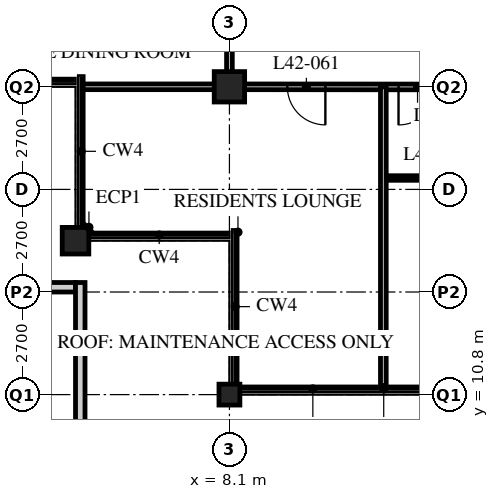
"""IFC4 building model, lengths in metres.
Left out: names, types, materials, properties, quantities, classifications, styles, units other than length and angle.
Written with IfcOpenShell. Run it as: python <this file> out.ifc"""

import sys

from ifc_helpers import new_model, si_unit, direction, frame, frame_2d, origin, origin_2d, place, context, subcontext, project, spatial, rectangle, hollow_rectangle, extrude, element, fill, save


model = new_model("IFC4")
c1 = context("Model", 3, precision=1e-05, world=origin(), true_north=direction((0.0, 1.0)))
c2 = subcontext(c1, "Body", "Model", "MODEL_VIEW")
j1 = project(units=[si_unit("LENGTHUNIT", "METRE"), si_unit("PLANEANGLEUNIT", "RADIAN")], contexts=[c1])
p1 = place(None, origin())
s1 = spatial("IfcSite", under=j1, at=p1, CompositionType="ELEMENT")
p2 = place(p1, origin())
s2 = spatial("IfcBuilding", under=s1, at=p2, CompositionType="ELEMENT")
p3 = place(p2, frame((0.0, 0.0, 165.0)))
s3 = spatial("IfcBuildingStorey", under=s2, at=p3, CompositionType="ELEMENT", Elevation=165.0)
p4 = place(p3, frame((4.05, 14.85, 0.0), z_axis=(0.0, 0.0, 1.0), x_axis=(1.0, 0.0, 0.0)))
e1 = element("IfcColumn", 1, at=p4, inside=s3, PredefinedType="COLUMN", context=c2, shape_type="SweptSolid", body=[
    extrude(hollow_rectangle(XDim=0.7, YDim=0.7, WallThickness=0.07, at=origin_2d()), origin(), (0.0, 0.0, 1.0), 5.4),
])
p5 = place(p3, frame((8.1, 10.8, 0.0), z_axis=(0.0, 0.0, 1.0), x_axis=(1.0, 0.0, 0.0)))
e2 = element("IfcColumn", 2, at=p5, inside=s3, PredefinedType="COLUMN", context=c2, shape_type="SweptSolid", body=[
    extrude(hollow_rectangle(XDim=0.55, YDim=0.55, WallThickness=0.04, at=origin_2d()), origin(), (0.0, 0.0, 1.0), 5.4),
])
p6 = place(p3, frame((8.1, 18.9, 0.0), z_axis=(0.0, 0.0, 1.0), x_axis=(1.0, 0.0, 0.0)))
e3 = element("IfcColumn", 3, at=p6, inside=s3, PredefinedType="COLUMN", context=c2, shape_type="SweptSolid", body=[
    extrude(hollow_rectangle(XDim=0.8, YDim=0.8, WallThickness=0.08, at=origin_2d()), origin(), (0.0, 0.0, 1.0), 5.4),
])
p7 = place(p3, frame((0.25, 13.625, 0.0), z_axis=(0.0, 0.0, 1.0), x_axis=(1.0, 0.0, 0.0)))
e4 = element("IfcWall", 4, at=p7, inside=s3, PredefinedType="PARAPET", context=c2, shape_type="SweptSolid", body=[
    extrude(rectangle(XDim=3.8, YDim=0.25, at=frame_2d((1.9, 0.0))), origin(), (0.0, 0.0, 1.0), 1.38),
])
p8 = place(p3, frame((4.175, 13.75, 0.0), z_axis=(0.0, 0.0, 1.0), x_axis=(0.0, -1.0, 0.0)))
e5 = element("IfcWall", 5, at=p8, inside=s3, PredefinedType="PARAPET", context=c2, shape_type="SweptSolid", body=[
    extrude(rectangle(XDim=4.3, YDim=0.25, at=frame_2d((2.15, 0.0))), origin(), (0.0, 0.0, 1.0), 1.38),
])
p9 = place(p3, frame((8.1, 18.9, 0.0), z_axis=(0.0, 0.0, 1.0), x_axis=(0.999999729567, -0.000735435758, 0.0)))
e6 = element("IfcWall", 6, at=p9, inside=s3, PredefinedType="PARTITIONING", context=c2, shape_type="SweptSolid", body=[
    extrude(rectangle(XDim=40.5, YDim=0.15, at=frame_2d((20.25, 0.0))), origin(), (0.0, 0.0, 1.0), 4.42),
])
p10 = place(p9, frame((4.45, 0.0, 0.0)))
e7 = element("IfcOpeningElement", 7, at=p10, cuts=e6, PredefinedType="OPENING", context=c2, shape_type="SweptSolid", body=[
    extrude(rectangle(XDim=1.0, YDim=2.1, at=frame_2d((0.5, 1.05))), frame((0.0, 0.085, 0.0), z_axis=(0.0, -1.0, 0.0), x_axis=(1.0, 0.0, 0.0)), (0.0, 0.0, 1.0), 0.17),
])
p11 = place(p9, frame((25.15, 0.0, 0.0)))
e8 = element("IfcOpeningElement", 8, at=p11, cuts=e6, PredefinedType="OPENING", context=c2, shape_type="SweptSolid", body=[
    extrude(rectangle(XDim=1.8, YDim=2.4, at=frame_2d((0.9, 1.2))), frame((0.0, 0.085, 0.0), z_axis=(0.0, -1.0, 0.0), x_axis=(1.0, 0.0, 0.0)), (0.0, 0.0, 1.0), 0.17),
])
p12 = place(p9, frame((29.875, 0.0, 0.0)))
e9 = element("IfcOpeningElement", 9, at=p12, cuts=e6, PredefinedType="OPENING", context=c2, shape_type="SweptSolid", body=[
    extrude(rectangle(XDim=1.0, YDim=2.1, at=frame_2d((0.5, 1.05))), frame((0.0, 0.085, 0.0), z_axis=(0.0, -1.0, 0.0), x_axis=(1.0, 0.0, 0.0)), (0.0, 0.0, 1.0), 0.17),
])
p13 = place(p9, frame((34.75, 0.0, 0.0)))
e10 = element("IfcOpeningElement", 10, at=p13, cuts=e6, PredefinedType="OPENING", context=c2, shape_type="SweptSolid", body=[
    extrude(rectangle(XDim=1.0, YDim=2.1, at=frame_2d((0.5, 1.05))), frame((0.0, 0.085, 0.0), z_axis=(0.0, -1.0, 0.0), x_axis=(1.0, 0.0, 0.0)), (0.0, 0.0, 1.0), 0.17),
])
p14 = place(p9, frame((1.525, 0.0, 0.0)))
e11 = element("IfcOpeningElement", 11, at=p14, cuts=e6, PredefinedType="OPENING", context=c2, shape_type="SweptSolid", body=[
    extrude(rectangle(XDim=1.0, YDim=2.1, at=frame_2d((0.5, 1.05))), frame((0.0, 0.085, 0.0), z_axis=(0.0, -1.0, 0.0), x_axis=(1.0, 0.0, 0.0)), (0.0, 0.0, 1.0), 0.17),
])
p15 = place(p9, frame((37.975, 0.0, 0.0)))
e12 = element("IfcOpeningElement", 12, at=p15, cuts=e6, PredefinedType="OPENING", context=c2, shape_type="SweptSolid", body=[
    extrude(rectangle(XDim=1.0, YDim=2.1, at=frame_2d((0.5, 1.05))), frame((0.0, 0.085, 0.0), z_axis=(0.0, -1.0, 0.0), x_axis=(1.0, 0.0, 0.0)), (0.0, 0.0, 1.0), 0.17),
])
p16 = place(p3, frame((8.1, 18.9, 0.0), z_axis=(0.0, 0.0, 1.0), x_axis=(0.0, 1.0, 0.0)))
e13 = element("IfcWall", 13, at=p16, inside=s3, PredefinedType="PARTITIONING", context=c2, shape_type="SweptSolid", body=[
    extrude(rectangle(XDim=32.43, YDim=0.15, at=frame_2d((16.215, 0.0))), origin(), (0.0, 0.0, 1.0), 4.42),
])
p17 = place(p16, frame((1.525, 0.0, 0.0)))
e14 = element("IfcOpeningElement", 14, at=p17, cuts=e13, PredefinedType="OPENING", context=c2, shape_type="SweptSolid", body=[
    extrude(rectangle(XDim=1.0, YDim=2.1, at=frame_2d((0.5, 1.05))), frame((0.0, 0.085, 0.0), z_axis=(0.0, -1.0, 0.0), x_axis=(1.0, 0.0, 0.0)), (0.0, 0.0, 1.0), 0.17),
])
p18 = place(p16, frame((8.95, 0.0, 0.0)))
e15 = element("IfcOpeningElement", 15, at=p18, cuts=e13, PredefinedType="OPENING", context=c2, shape_type="SweptSolid", body=[
    extrude(rectangle(XDim=1.8, YDim=2.4, at=frame_2d((0.9, 1.2))), frame((0.0, 0.085, 0.0), z_axis=(0.0, -1.0, 0.0), x_axis=(1.0, 0.0, 0.0)), (0.0, 0.0, 1.0), 0.17),
])
p19 = place(p16, frame((12.55, 0.0, 0.0)))
e16 = element("IfcOpeningElement", 16, at=p19, cuts=e13, PredefinedType="OPENING", context=c2, shape_type="SweptSolid", body=[
    extrude(rectangle(XDim=1.0, YDim=2.1, at=frame_2d((0.5, 1.05))), frame((0.0, 0.085, 0.0), z_axis=(0.0, -1.0, 0.0), x_axis=(1.0, 0.0, 0.0)), (0.0, 0.0, 1.0), 0.17),
])
p20 = place(p16, frame((20.65, 0.0, 0.0)))
e17 = element("IfcOpeningElement", 17, at=p20, cuts=e13, PredefinedType="OPENING", context=c2, shape_type="SweptSolid", body=[
    extrude(rectangle(XDim=1.0, YDim=2.1, at=frame_2d((0.5, 1.05))), frame((0.0, 0.085, 0.0), z_axis=(0.0, -1.0, 0.0), x_axis=(1.0, 0.0, 0.0)), (0.0, 0.0, 1.0), 0.17),
])
p21 = place(p16, frame((29.05, 0.0, 0.0)))
e18 = element("IfcOpeningElement", 18, at=p21, cuts=e13, PredefinedType="OPENING", context=c2, shape_type="SweptSolid", body=[
    extrude(rectangle(XDim=1.0, YDim=2.1, at=frame_2d((0.5, 1.05))), frame((0.0, 0.085, 0.0), z_axis=(0.0, -1.0, 0.0), x_axis=(1.0, 0.0, 0.0)), (0.0, 0.0, 1.0), 0.17),
])
p22 = place(p3, frame((12.15, 16.5, 0.0), z_axis=(0.0, 0.0, 1.0), x_axis=(1.0, 0.0, 0.0)))
e19 = element("IfcWall", 19, at=p22, inside=s3, PredefinedType="PARTITIONING", context=c2, shape_type="SweptSolid", body=[
    extrude(rectangle(XDim=16.2, YDim=0.12, at=frame_2d((8.1, 0.0))), origin(), (0.0, 0.0, 1.0), 5.19),
])
p23 = place(p22, frame((0.975, 0.0, 0.0)))
e20 = element("IfcOpeningElement", 20, at=p23, cuts=e19, PredefinedType="OPENING", context=c2, shape_type="SweptSolid", body=[
    extrude(rectangle(XDim=0.85, YDim=2.1, at=frame_2d((0.425, 1.05))), frame((0.0, 0.07, 0.0), z_axis=(0.0, -1.0, 0.0), x_axis=(1.0, 0.0, 0.0)), (0.0, 0.0, 1.0), 0.14),
])
p24 = place(p22, frame((8.425, 0.0, 0.0)))
e21 = element("IfcOpeningElement", 21, at=p24, cuts=e19, PredefinedType="OPENING", context=c2, shape_type="SweptSolid", body=[
    extrude(rectangle(XDim=0.85, YDim=2.1, at=frame_2d((0.425, 1.05))), frame((0.0, 0.07, 0.0), z_axis=(0.0, -1.0, 0.0), x_axis=(1.0, 0.0, 0.0)), (0.0, 0.0, 1.0), 0.14),
])
p25 = place(p22, frame((12.475, 0.0, 0.0)))
e22 = element("IfcOpeningElement", 22, at=p25, cuts=e19, PredefinedType="OPENING", context=c2, shape_type="SweptSolid", body=[
    extrude(rectangle(XDim=0.85, YDim=2.1, at=frame_2d((0.425, 1.05))), frame((0.0, 0.07, 0.0), z_axis=(0.0, -1.0, 0.0), x_axis=(1.0, 0.0, 0.0)), (0.0, 0.0, 1.0), 0.14),
])
p26 = place(p3, frame((4.217, 18.9, 0.0), z_axis=(0.0, 0.0, 1.0), x_axis=(1.0, 0.0, 0.0)))
e23 = element("IfcWall", 23, at=p26, inside=s3, PredefinedType="PARTITIONING", context=c2, shape_type="SweptSolid", body=[
    extrude(rectangle(XDim=3.883, YDim=0.15, at=frame_2d((1.941, 0.0))), origin(), (0.0, 0.0, 1.0), 4.42),
])
p27 = place(p3, frame((12.15, 18.9, 0.0), z_axis=(0.0, 0.0, 1.0), x_axis=(0.0, -1.0, 0.0)))
e24 = element("IfcWall", 24, at=p27, inside=s3, PredefinedType="PARTITIONING", context=c2, shape_type="SweptSolid", body=[
    extrude(rectangle(XDim=7.865, YDim=0.15, at=frame_2d((3.932, 0.0))), origin(), (0.0, 0.0, 1.0), 5.19),
])
p28 = place(p10, origin())
e25 = element("IfcDoor", 25, at=p28, inside=s3, OperationType="SINGLE_SWING_RIGHT", PredefinedType="DOOR", context=c2, shape_type="SweptSolid", body=[
    extrude(rectangle(XDim=1.0, YDim=2.1, at=frame_2d((0.5, 1.05))), frame((0.0, 0.025, 0.0), z_axis=(0.0, -1.0, 0.0), x_axis=(1.0, 0.0, 0.0)), (0.0, 0.0, 1.0), 0.05),
])
fill(e7, e25)
p29 = place(p14, origin())
e26 = element("IfcDoor", 26, at=p29, inside=s3, OperationType="SINGLE_SWING_LEFT", PredefinedType="DOOR", context=c2, shape_type="SweptSolid", body=[
    extrude(rectangle(XDim=1.0, YDim=2.1, at=frame_2d((0.5, 1.05))), frame((0.0, 0.025, 0.0), z_axis=(0.0, -1.0, 0.0), x_axis=(1.0, 0.0, 0.0)), (0.0, 0.0, 1.0), 0.05),
])
fill(e11, e26)
save(model, sys.argv[1])
